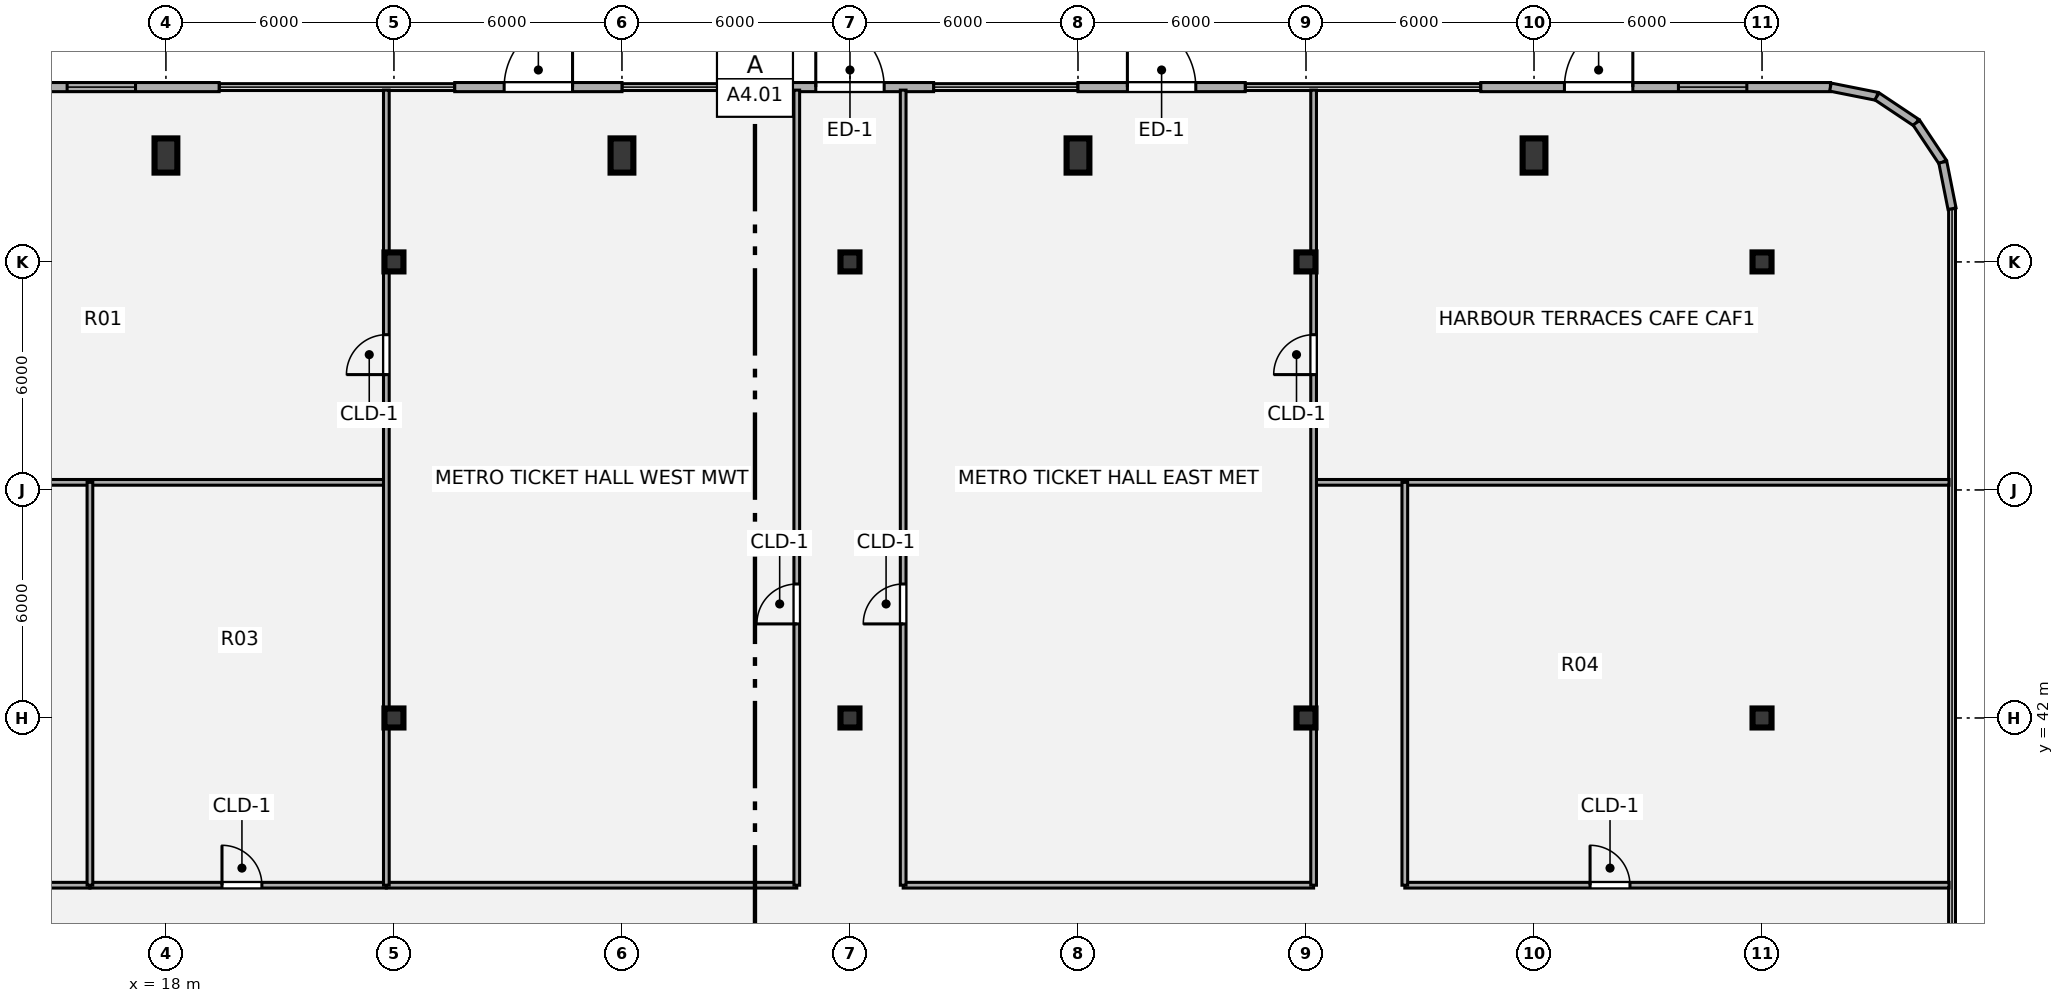
"""IFC4 building model, lengths in metres.
Left out: names, types, materials, properties, quantities, classifications, styles, units other than length and angle.
Written with IfcOpenShell. Run it as: python <this file> out.ifc"""

import sys

from ifc_helpers import new_model, si_unit, direction, frame, frame_2d, origin, origin_2d, place, context, subcontext, project, spatial, rectangle, i_section, extrude, source, transform, mapped, element, fill, save


model = new_model("IFC4")
c1 = context("Model", 3, precision=1e-05, world=origin(), true_north=direction((0.0, 1.0)))
c2 = subcontext(c1, "Body", "Model", "MODEL_VIEW")
j1 = project(units=[si_unit("LENGTHUNIT", "METRE"), si_unit("PLANEANGLEUNIT", "RADIAN")], contexts=[c1])
p1 = place(None, origin())
s1 = spatial("IfcSite", under=j1, at=p1, CompositionType="ELEMENT")
p2 = place(p1, origin())
s2 = spatial("IfcBuilding", under=s1, at=p2, CompositionType="ELEMENT")
p3 = place(p2, origin())
s3 = spatial("IfcBuildingStorey", under=s2, at=p3, CompositionType="ELEMENT", Elevation=0.0)
m1 = source(origin(), c2, "Body", "SweptSolid", [
    extrude(i_section(OverallWidth=0.5, OverallDepth=0.5, WebThickness=0.028, FlangeThickness=0.045, at=origin_2d()), origin(), (0.0, 0.0, 1.0), 5.4),
])
for number, where, z_axis, x_axis in (
    (1, (24.0, 42.0, 0.0), (0.0, 0.0, 1.0), (1.0, 0.0, 0.0)),
    (2, (36.0, 42.0, 0.0), (0.0, 0.0, 1.0), (1.0, 0.0, 0.0)),
    (3, (48.0, 42.0, 0.0), (0.0, 0.0, 1.0), (1.0, 0.0, 0.0)),
    (4, (60.0, 42.0, 0.0), (0.0, 0.0, 1.0), (1.0, 0.0, 0.0)),
    (5, (24.0, 54.0, 0.0), (0.0, 0.0, 1.0), (1.0, 0.0, 0.0)),
    (6, (36.0, 54.0, 0.0), (0.0, 0.0, 1.0), (1.0, 0.0, 0.0)),
    (7, (48.0, 54.0, 0.0), (0.0, 0.0, 1.0), (1.0, 0.0, 0.0)),
    (8, (60.0, 54.0, 0.0), (0.0, 0.0, 1.0), (1.0, 0.0, 0.0)),
):
    element("IfcColumn", number, at=place(p3, frame(where, z_axis=z_axis, x_axis=x_axis)), inside=s3, PredefinedType="COLUMN", context=c2, shape_type="MappedRepresentation", body=[
        mapped(m1, transform((0.0, 0.0, 0.0), x_axis=(1.0, 0.0, 0.0), y_axis=(0.0, 1.0, 0.0), z_axis=(0.0, 0.0, 1.0), scale=1.0)),
    ])
m2 = source(origin(), c2, "Body", "SweptSolid", [
    extrude(rectangle(XDim=0.6, YDim=0.9, at=origin_2d()), origin(), (0.0, 0.0, 1.0), 5.4),
])
for number, where, z_axis, x_axis in (
    (9, (18.0, 56.8, 0.0), (0.0, 0.0, 1.0), (1.0, 0.0, 0.0)),
    (10, (30.0, 56.8, 0.0), (0.0, 0.0, 1.0), (1.0, 0.0, 0.0)),
    (11, (42.0, 56.8, 0.0), (0.0, 0.0, 1.0), (1.0, 0.0, 0.0)),
    (12, (54.0, 56.8, 0.0), (0.0, 0.0, 1.0), (1.0, 0.0, 0.0)),
):
    element("IfcColumn", number, at=place(p3, frame(where, z_axis=z_axis, x_axis=x_axis)), inside=s3, PredefinedType="PILASTER", context=c2, shape_type="MappedRepresentation", body=[
        mapped(m2, transform((0.0, 0.0, 0.0), x_axis=(1.0, 0.0, 0.0), y_axis=(0.0, 1.0, 0.0), z_axis=(0.0, 0.0, 1.0), scale=1.0)),
    ])
p4 = place(p3, frame((10.2, 58.6, 0.0), z_axis=(0.0, 0.0, 1.0), x_axis=(1.0, 0.0, 0.0)))
e13 = element("IfcWall", 13, at=p4, inside=s3, PredefinedType="SOLIDWALL", context=c2, shape_type="SweptSolid", body=[
    extrude(rectangle(XDim=9.2, YDim=0.24, at=frame_2d((4.6, 0.0))), origin(), (0.0, 0.0, 1.0), 5.12),
])
p5 = place(p4, frame((2.2, 0.0, 0.0)))
e14 = element("IfcOpeningElement", 14, at=p5, cuts=e13, PredefinedType="OPENING", context=c2, shape_type="SweptSolid", body=[
    extrude(rectangle(XDim=1.8, YDim=2.3, at=origin_2d()), frame((0.9, 0.13, 1.15), z_axis=(0.0, -1.0, 0.0), x_axis=(1.0, 0.0, 0.0)), (0.0, 0.0, 1.0), 0.26),
])
p6 = place(p4, frame((5.2, 0.0, 0.9)))
e15 = element("IfcOpeningElement", 15, at=p6, cuts=e13, PredefinedType="OPENING", context=c2, shape_type="SweptSolid", body=[
    extrude(rectangle(XDim=1.8, YDim=1.5, at=origin_2d()), frame((0.9, 0.13, 0.75), z_axis=(0.0, -1.0, 0.0), x_axis=(1.0, 0.0, 0.0)), (0.0, 0.0, 1.0), 0.26),
])
p7 = place(p3, frame((25.6, 58.6, 0.0), z_axis=(0.0, 0.0, 1.0), x_axis=(1.0, 0.0, 0.0)))
e16 = element("IfcWall", 16, at=p7, inside=s3, PredefinedType="SOLIDWALL", context=c2, shape_type="SweptSolid", body=[
    extrude(rectangle(XDim=4.4, YDim=0.24, at=frame_2d((2.2, 0.0))), origin(), (0.0, 0.0, 1.0), 5.12),
])
p8 = place(p7, frame((1.3, 0.0, 0.0)))
e17 = element("IfcOpeningElement", 17, at=p8, cuts=e16, PredefinedType="OPENING", context=c2, shape_type="SweptSolid", body=[
    extrude(rectangle(XDim=1.8, YDim=2.3, at=origin_2d()), frame((0.9, 0.13, 1.15), z_axis=(0.0, -1.0, 0.0), x_axis=(1.0, 0.0, 0.0)), (0.0, 0.0, 1.0), 0.26),
])
p9 = place(p3, frame((33.8, 58.6, 0.0), z_axis=(0.0, 0.0, 1.0), x_axis=(1.0, 0.0, 0.0)))
e18 = element("IfcWall", 18, at=p9, inside=s3, PredefinedType="SOLIDWALL", context=c2, shape_type="SweptSolid", body=[
    extrude(rectangle(XDim=4.4, YDim=0.24, at=frame_2d((2.2, 0.0))), origin(), (0.0, 0.0, 1.0), 5.12),
])
p10 = place(p9, frame((1.3, 0.0, 0.0)))
e19 = element("IfcOpeningElement", 19, at=p10, cuts=e18, PredefinedType="OPENING", context=c2, shape_type="SweptSolid", body=[
    extrude(rectangle(XDim=1.8, YDim=2.3, at=origin_2d()), frame((0.9, 0.13, 1.15), z_axis=(0.0, -1.0, 0.0), x_axis=(1.0, 0.0, 0.0)), (0.0, 0.0, 1.0), 0.26),
])
p11 = place(p3, frame((42.0, 58.6, 0.0), z_axis=(0.0, 0.0, 1.0), x_axis=(1.0, 0.0, 0.0)))
e20 = element("IfcWall", 20, at=p11, inside=s3, PredefinedType="SOLIDWALL", context=c2, shape_type="SweptSolid", body=[
    extrude(rectangle(XDim=4.4, YDim=0.24, at=frame_2d((2.2, 0.0))), origin(), (0.0, 0.0, 1.0), 5.12),
])
p12 = place(p11, frame((1.3, 0.0, 0.0)))
e21 = element("IfcOpeningElement", 21, at=p12, cuts=e20, PredefinedType="OPENING", context=c2, shape_type="SweptSolid", body=[
    extrude(rectangle(XDim=1.8, YDim=2.3, at=origin_2d()), frame((0.9, 0.13, 1.15), z_axis=(0.0, -1.0, 0.0), x_axis=(1.0, 0.0, 0.0)), (0.0, 0.0, 1.0), 0.26),
])
p13 = place(p3, frame((52.6, 58.6, 0.0), z_axis=(0.0, 0.0, 1.0), x_axis=(1.0, 0.0, 0.0)))
e22 = element("IfcWall", 22, at=p13, inside=s3, PredefinedType="SOLIDWALL", context=c2, shape_type="SweptSolid", body=[
    extrude(rectangle(XDim=9.2, YDim=0.24, at=frame_2d((4.6, 0.0))), origin(), (0.0, 0.0, 1.0), 5.12),
])
p14 = place(p13, frame((2.2, 0.0, 0.0)))
e23 = element("IfcOpeningElement", 23, at=p14, cuts=e22, PredefinedType="OPENING", context=c2, shape_type="SweptSolid", body=[
    extrude(rectangle(XDim=1.8, YDim=2.3, at=origin_2d()), frame((0.9, 0.13, 1.15), z_axis=(0.0, -1.0, 0.0), x_axis=(1.0, 0.0, 0.0)), (0.0, 0.0, 1.0), 0.26),
])
p15 = place(p13, frame((5.2, 0.0, 0.9)))
e24 = element("IfcOpeningElement", 24, at=p15, cuts=e22, PredefinedType="OPENING", context=c2, shape_type="SweptSolid", body=[
    extrude(rectangle(XDim=1.8, YDim=1.5, at=origin_2d()), frame((0.9, 0.13, 0.75), z_axis=(0.0, -1.0, 0.0), x_axis=(1.0, 0.0, 0.0)), (0.0, 0.0, 1.0), 0.26),
])
for number, where, z_axis, x_axis in (
    (25, (61.8, 58.6, 0.0), (0.0, 0.0, 1.0), (0.981, -0.195, 0.0)),
    (26, (63.025, 58.356, 0.0), (0.0, 0.0, 1.0), (0.831, -0.556, 0.0)),
    (27, (64.063, 57.663, 0.0), (0.0, 0.0, 1.0), (0.556, -0.831, 0.0)),
    (28, (64.756, 56.625, 0.0), (0.0, 0.0, 1.0), (0.195, -0.981, 0.0)),
):
    element("IfcWall", number, at=place(p3, frame(where, z_axis=z_axis, x_axis=x_axis)), inside=s3, PredefinedType="SOLIDWALL", context=c2, shape_type="SweptSolid", body=[
        extrude(rectangle(XDim=1.249, YDim=0.215, at=frame_2d((0.624, 0.0))), origin(), (0.0, 0.0, 1.0), 5.12),
    ])
p16 = place(p3, frame((7.08, 37.6, 0.0), z_axis=(0.0, 0.0, 1.0), x_axis=(1.0, 0.0, 0.0)))
e29 = element("IfcWall", 29, at=p16, inside=s3, PredefinedType="PARTITIONING", context=c2, shape_type="SweptSolid", body=[
    extrude(rectangle(XDim=8.92, YDim=0.15, at=frame_2d((4.46, 0.0))), origin(), (0.0, 0.0, 1.0), 5.09),
])
p17 = place(p16, frame((4.395, 0.0, 0.0)))
e30 = element("IfcOpeningElement", 30, at=p17, cuts=e29, PredefinedType="OPENING", context=c2, shape_type="SweptSolid", body=[
    extrude(rectangle(XDim=1.05, YDim=2.1, at=origin_2d()), frame((0.525, 0.085, 1.05), z_axis=(0.0, -1.0, 0.0), x_axis=(1.0, 0.0, 0.0)), (0.0, 0.0, 1.0), 0.17),
])
p18 = place(p3, frame((16.0, 37.6, 0.0), z_axis=(0.0, 0.0, 1.0), x_axis=(1.0, 0.0, 0.0)))
e31 = element("IfcWall", 31, at=p18, inside=s3, PredefinedType="PARTITIONING", context=c2, shape_type="SweptSolid", body=[
    extrude(rectangle(XDim=7.8, YDim=0.15, at=frame_2d((3.9, 0.0))), origin(), (0.0, 0.0, 1.0), 5.09),
])
p19 = place(p18, frame((3.475, 0.0, 0.0)))
e32 = element("IfcOpeningElement", 32, at=p19, cuts=e31, PredefinedType="OPENING", context=c2, shape_type="SweptSolid", body=[
    extrude(rectangle(XDim=1.05, YDim=2.1, at=origin_2d()), frame((0.525, 0.085, 1.05), z_axis=(0.0, -1.0, 0.0), x_axis=(1.0, 0.0, 0.0)), (0.0, 0.0, 1.0), 0.17),
])
for number, where, z_axis, x_axis in (
    (33, (23.8, 37.6, 0.0), (0.0, 0.0, 1.0), (1.0, 0.0, 0.0)),
    (34, (37.4, 37.6, 0.0), (0.0, 0.0, 1.0), (1.0, 0.0, 0.0)),
):
    element("IfcWall", number, at=place(p3, frame(where, z_axis=z_axis, x_axis=x_axis)), inside=s3, PredefinedType="PARTITIONING", context=c2, shape_type="SweptSolid", body=[
        extrude(rectangle(XDim=10.8, YDim=0.15, at=frame_2d((5.4, 0.0))), origin(), (0.0, 0.0, 1.0), 5.09),
    ])
p20 = place(p3, frame((50.6, 37.6, 0.0), z_axis=(0.0, 0.0, 1.0), x_axis=(1.0, 0.0, 0.0)))
e35 = element("IfcWall", 35, at=p20, inside=s3, PredefinedType="PARTITIONING", context=c2, shape_type="SweptSolid", body=[
    extrude(rectangle(XDim=14.32, YDim=0.15, at=frame_2d((7.16, 0.0))), origin(), (0.0, 0.0, 1.0), 5.09),
])
p21 = place(p20, frame((4.875, 0.0, 0.0)))
e36 = element("IfcOpeningElement", 36, at=p21, cuts=e35, PredefinedType="OPENING", context=c2, shape_type="SweptSolid", body=[
    extrude(rectangle(XDim=1.05, YDim=2.1, at=origin_2d()), frame((0.525, 0.085, 1.05), z_axis=(0.0, -1.0, 0.0), x_axis=(1.0, 0.0, 0.0)), (0.0, 0.0, 1.0), 0.17),
])
for number, where, z_axis, x_axis in (
    (37, (7.08, 48.2, 0.0), (0.0, 0.0, 1.0), (1.0, 0.0, 0.0)),
    (38, (48.2, 48.2, 0.0), (0.0, 0.0, 1.0), (1.0, 0.0, 0.0)),
):
    element("IfcWall", number, at=place(p3, frame(where, z_axis=z_axis, x_axis=x_axis)), inside=s3, PredefinedType="PARTITIONING", context=c2, shape_type="SweptSolid", body=[
        extrude(rectangle(XDim=16.72, YDim=0.15, at=frame_2d((8.36, 0.0))), origin(), (0.0, 0.0, 1.0), 5.09),
    ])
p22 = place(p3, frame((16.0, 37.6, 0.0), z_axis=(0.0, 0.0, 1.0), x_axis=(0.0, 1.0, 0.0)))
e39 = element("IfcWall", 39, at=p22, inside=s3, PredefinedType="PARTITIONING", context=c2, shape_type="SweptSolid", body=[
    extrude(rectangle(XDim=10.6, YDim=0.15, at=frame_2d((5.3, 0.0))), origin(), (0.0, 0.0, 1.0), 4.746),
])
p23 = place(p3, frame((23.8, 37.6, 0.0), z_axis=(0.0, 0.0, 1.0), x_axis=(0.0, 1.0, 0.0)))
e40 = element("IfcWall", 40, at=p23, inside=s3, PredefinedType="PARTITIONING", context=c2, shape_type="SweptSolid", body=[
    extrude(rectangle(XDim=20.92, YDim=0.15, at=frame_2d((10.46, 0.0))), origin(), (0.0, 0.0, 1.0), 4.305),
])
p24 = place(p23, frame((13.435, 0.0, 0.0)))
e41 = element("IfcOpeningElement", 41, at=p24, cuts=e40, PredefinedType="OPENING", context=c2, shape_type="SweptSolid", body=[
    extrude(rectangle(XDim=1.05, YDim=2.1, at=origin_2d()), frame((0.525, 0.085, 1.05), z_axis=(0.0, -1.0, 0.0), x_axis=(1.0, 0.0, 0.0)), (0.0, 0.0, 1.0), 0.17),
])
p25 = place(p3, frame((34.6, 37.6, 0.0), z_axis=(0.0, 0.0, 1.0), x_axis=(0.0, 1.0, 0.0)))
e42 = element("IfcWall", 42, at=p25, inside=s3, PredefinedType="PARTITIONING", context=c2, shape_type="SweptSolid", body=[
    extrude(rectangle(XDim=20.92, YDim=0.15, at=frame_2d((10.46, 0.0))), origin(), (0.0, 0.0, 1.0), 4.746),
])
p26 = place(p25, frame((6.875, 0.0, 0.0)))
e43 = element("IfcOpeningElement", 43, at=p26, cuts=e42, PredefinedType="OPENING", context=c2, shape_type="SweptSolid", body=[
    extrude(rectangle(XDim=1.05, YDim=2.1, at=origin_2d()), frame((0.525, 0.085, 1.05), z_axis=(0.0, -1.0, 0.0), x_axis=(1.0, 0.0, 0.0)), (0.0, 0.0, 1.0), 0.17),
])
p27 = place(p3, frame((37.4, 37.6, 0.0), z_axis=(0.0, 0.0, 1.0), x_axis=(0.0, 1.0, 0.0)))
e44 = element("IfcWall", 44, at=p27, inside=s3, PredefinedType="PARTITIONING", context=c2, shape_type="SweptSolid", body=[
    extrude(rectangle(XDim=20.92, YDim=0.15, at=frame_2d((10.46, 0.0))), origin(), (0.0, 0.0, 1.0), 4.746),
])
p28 = place(p27, frame((6.875, 0.0, 0.0)))
e45 = element("IfcOpeningElement", 45, at=p28, cuts=e44, PredefinedType="OPENING", context=c2, shape_type="SweptSolid", body=[
    extrude(rectangle(XDim=1.05, YDim=2.1, at=origin_2d()), frame((0.525, 0.085, 1.05), z_axis=(0.0, -1.0, 0.0), x_axis=(1.0, 0.0, 0.0)), (0.0, 0.0, 1.0), 0.17),
])
p29 = place(p3, frame((48.2, 37.6, 0.0), z_axis=(0.0, 0.0, 1.0), x_axis=(0.0, 1.0, 0.0)))
e46 = element("IfcWall", 46, at=p29, inside=s3, PredefinedType="PARTITIONING", context=c2, shape_type="SweptSolid", body=[
    extrude(rectangle(XDim=20.92, YDim=0.15, at=frame_2d((10.46, 0.0))), origin(), (0.0, 0.0, 1.0), 4.305),
])
p30 = place(p29, frame((13.435, 0.0, 0.0)))
e47 = element("IfcOpeningElement", 47, at=p30, cuts=e46, PredefinedType="OPENING", context=c2, shape_type="SweptSolid", body=[
    extrude(rectangle(XDim=1.05, YDim=2.1, at=origin_2d()), frame((0.525, 0.085, 1.05), z_axis=(0.0, -1.0, 0.0), x_axis=(1.0, 0.0, 0.0)), (0.0, 0.0, 1.0), 0.17),
])
p31 = place(p3, frame((50.6, 37.6, 0.0), z_axis=(0.0, 0.0, 1.0), x_axis=(0.0, 1.0, 0.0)))
e48 = element("IfcWall", 48, at=p31, inside=s3, PredefinedType="PARTITIONING", context=c2, shape_type="SweptSolid", body=[
    extrude(rectangle(XDim=10.6, YDim=0.15, at=frame_2d((5.3, 0.0))), origin(), (0.0, 0.0, 1.0), 4.746),
])
m3 = source(origin(), c2, "Body", "SweptSolid", [
    extrude(rectangle(XDim=1.8, YDim=1.5, at=origin_2d()), frame((0.9, 0.03, 0.75), z_axis=(0.0, -1.0, 0.0), x_axis=(1.0, 0.0, 0.0)), (0.0, 0.0, 1.0), 0.06),
])
p32 = place(p6, origin())
e49 = element("IfcWindow", 49, at=p32, inside=s3, PartitioningType="SINGLE_PANEL", PredefinedType="WINDOW", context=c2, shape_type="MappedRepresentation", body=[
    mapped(m3, transform((0.0, 0.0, 0.0), x_axis=(1.0, 0.0, 0.0), y_axis=(0.0, 1.0, 0.0), z_axis=(0.0, 0.0, 1.0), scale=1.0)),
])
fill(e15, e49)
m4 = source(origin(), c2, "Body", "SweptSolid", [
    extrude(rectangle(XDim=1.8, YDim=2.3, at=origin_2d()), frame((0.9, 0.025, 1.15), z_axis=(0.0, -1.0, 0.0), x_axis=(1.0, 0.0, 0.0)), (0.0, 0.0, 1.0), 0.05),
])
p33 = place(p8, origin())
e50 = element("IfcDoor", 50, at=p33, inside=s3, OperationType="SINGLE_SWING_RIGHT", PredefinedType="DOOR", context=c2, shape_type="MappedRepresentation", body=[
    mapped(m4, transform((0.0, 0.0, 0.0), x_axis=(1.0, 0.0, 0.0), y_axis=(0.0, 1.0, 0.0), z_axis=(0.0, 0.0, 1.0), scale=1.0)),
])
fill(e17, e50)
p34 = place(p10, origin())
e51 = element("IfcDoor", 51, at=p34, inside=s3, OperationType="SINGLE_SWING_LEFT", PredefinedType="DOOR", context=c2, shape_type="MappedRepresentation", body=[
    mapped(m4, transform((0.0, 0.0, 0.0), x_axis=(1.0, 0.0, 0.0), y_axis=(0.0, 1.0, 0.0), z_axis=(0.0, 0.0, 1.0), scale=1.0)),
])
fill(e19, e51)
p35 = place(p12, origin())
e52 = element("IfcDoor", 52, at=p35, inside=s3, OperationType="SINGLE_SWING_LEFT", PredefinedType="DOOR", context=c2, shape_type="MappedRepresentation", body=[
    mapped(m4, transform((0.0, 0.0, 0.0), x_axis=(1.0, 0.0, 0.0), y_axis=(0.0, 1.0, 0.0), z_axis=(0.0, 0.0, 1.0), scale=1.0)),
])
fill(e21, e52)
p36 = place(p14, origin())
e53 = element("IfcDoor", 53, at=p36, inside=s3, OperationType="SINGLE_SWING_RIGHT", PredefinedType="DOOR", context=c2, shape_type="MappedRepresentation", body=[
    mapped(m4, transform((0.0, 0.0, 0.0), x_axis=(1.0, 0.0, 0.0), y_axis=(0.0, 1.0, 0.0), z_axis=(0.0, 0.0, 1.0), scale=1.0)),
])
fill(e23, e53)
p37 = place(p15, origin())
e54 = element("IfcWindow", 54, at=p37, inside=s3, PartitioningType="SINGLE_PANEL", PredefinedType="WINDOW", context=c2, shape_type="MappedRepresentation", body=[
    mapped(m3, transform((0.0, 0.0, 0.0), x_axis=(1.0, 0.0, 0.0), y_axis=(0.0, 1.0, 0.0), z_axis=(0.0, 0.0, 1.0), scale=1.0)),
])
fill(e24, e54)
m5 = source(origin(), c2, "Body", "SweptSolid", [
    extrude(rectangle(XDim=1.05, YDim=2.1, at=origin_2d()), frame((0.525, 0.025, 1.05), z_axis=(0.0, -1.0, 0.0), x_axis=(1.0, 0.0, 0.0)), (0.0, 0.0, 1.0), 0.05),
])
p38 = place(p19, origin())
e55 = element("IfcDoor", 55, at=p38, inside=s3, OperationType="SINGLE_SWING_LEFT", PredefinedType="DOOR", context=c2, shape_type="MappedRepresentation", body=[
    mapped(m5, transform((0.0, 0.0, 0.0), x_axis=(1.0, 0.0, 0.0), y_axis=(0.0, 1.0, 0.0), z_axis=(0.0, 0.0, 1.0), scale=1.0)),
])
fill(e32, e55)
p39 = place(p21, origin())
e56 = element("IfcDoor", 56, at=p39, inside=s3, OperationType="SINGLE_SWING_LEFT", PredefinedType="DOOR", context=c2, shape_type="MappedRepresentation", body=[
    mapped(m5, transform((0.0, 0.0, 0.0), x_axis=(1.0, 0.0, 0.0), y_axis=(0.0, 1.0, 0.0), z_axis=(0.0, 0.0, 1.0), scale=1.0)),
])
fill(e36, e56)
p40 = place(p24, origin())
e57 = element("IfcDoor", 57, at=p40, inside=s3, OperationType="SINGLE_SWING_LEFT", PredefinedType="DOOR", context=c2, shape_type="MappedRepresentation", body=[
    mapped(m5, transform((0.0, 0.0, 0.0), x_axis=(1.0, 0.0, 0.0), y_axis=(0.0, 1.0, 0.0), z_axis=(0.0, 0.0, 1.0), scale=1.0)),
])
fill(e41, e57)
p41 = place(p26, origin())
e58 = element("IfcDoor", 58, at=p41, inside=s3, OperationType="SINGLE_SWING_LEFT", PredefinedType="DOOR", context=c2, shape_type="MappedRepresentation", body=[
    mapped(m5, transform((0.0, 0.0, 0.0), x_axis=(1.0, 0.0, 0.0), y_axis=(0.0, 1.0, 0.0), z_axis=(0.0, 0.0, 1.0), scale=1.0)),
])
fill(e43, e58)
p42 = place(p28, origin())
e59 = element("IfcDoor", 59, at=p42, inside=s3, OperationType="SINGLE_SWING_LEFT", PredefinedType="DOOR", context=c2, shape_type="MappedRepresentation", body=[
    mapped(m5, transform((0.0, 0.0, 0.0), x_axis=(1.0, 0.0, 0.0), y_axis=(0.0, 1.0, 0.0), z_axis=(0.0, 0.0, 1.0), scale=1.0)),
])
fill(e45, e59)
p43 = place(p30, origin())
e60 = element("IfcDoor", 60, at=p43, inside=s3, OperationType="SINGLE_SWING_LEFT", PredefinedType="DOOR", context=c2, shape_type="MappedRepresentation", body=[
    mapped(m5, transform((0.0, 0.0, 0.0), x_axis=(1.0, 0.0, 0.0), y_axis=(0.0, 1.0, 0.0), z_axis=(0.0, 0.0, 1.0), scale=1.0)),
])
fill(e47, e60)
save(model, sys.argv[1])
